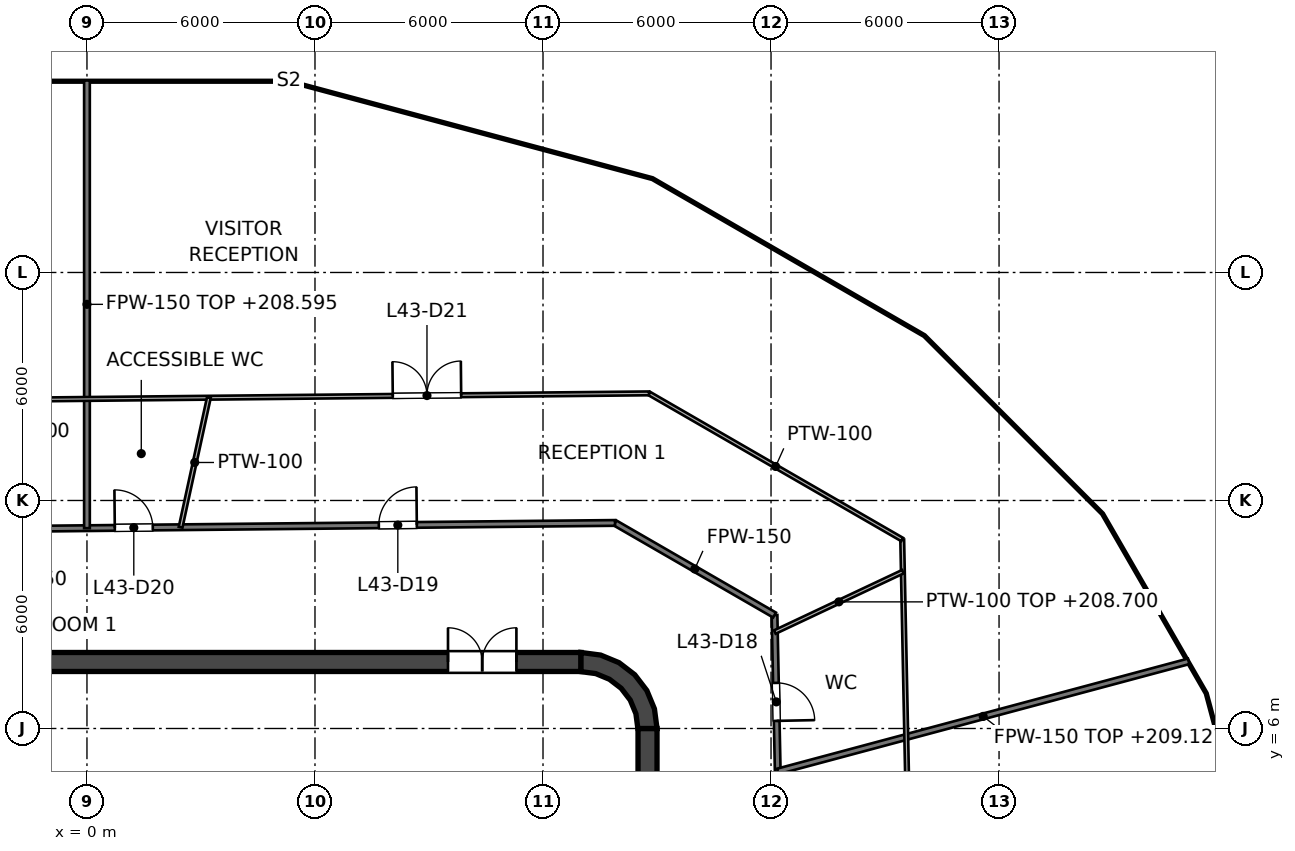
"""IFC4 building model, lengths in metres.
Left out: names, types, materials, properties, quantities, classifications, styles, units other than length and angle.
Written with IfcOpenShell. Run it as: python <this file> out.ifc"""

import sys

from ifc_helpers import new_model, si_unit, direction, frame, frame_2d, origin, place, context, subcontext, project, spatial, polyline, rectangle, outline, extrude, element, fill, save


model = new_model("IFC4")
c1 = context("Model", 3, precision=1e-05, world=origin(), true_north=direction((0.0, 1.0)))
c2 = subcontext(c1, "Body", "Model", "MODEL_VIEW")
j1 = project(units=[si_unit("LENGTHUNIT", "METRE"), si_unit("PLANEANGLEUNIT", "RADIAN")], contexts=[c1])
p1 = place(None, origin())
s1 = spatial("IfcSite", under=j1, at=p1, CompositionType="ELEMENT")
p2 = place(p1, origin())
s2 = spatial("IfcBuilding", under=s1, at=p2, CompositionType="ELEMENT")
p3 = place(p2, frame((0.0, 0.0, 203.0)))
s3 = spatial("IfcBuildingStorey", under=s2, at=p3, CompositionType="ELEMENT", Elevation=203.0)
p4 = place(p3, frame((-13.0, 7.75, 0.0), z_axis=(0.0, 0.0, 1.0), x_axis=(1.0, 0.0, 0.0)))
e1 = element("IfcWall", 1, at=p4, inside=s3, PredefinedType="SHEAR", context=c2, shape_type="SweptSolid", body=[
    extrude(rectangle(XDim=26.0, YDim=0.5, at=frame_2d((13.0, 0.0))), origin(), (0.0, 0.0, 1.0), 6.45),
])
p5 = place(p4, frame((1.7, 0.0, 0.0)))
e2 = element("IfcOpeningElement", 2, at=p5, cuts=e1, PredefinedType="OPENING", context=c2, shape_type="SweptSolid", body=[
    extrude(rectangle(XDim=1.8, YDim=2.1, at=frame_2d((0.9, 1.05))), frame((0.0, 0.25, 0.0), z_axis=(0.0, -1.0, 0.0), x_axis=(1.0, 0.0, 0.0)), (0.0, 0.0, 1.0), 0.5),
])
p6 = place(p4, frame((22.5, 0.0, 0.0)))
e3 = element("IfcOpeningElement", 3, at=p6, cuts=e1, PredefinedType="OPENING", context=c2, shape_type="SweptSolid", body=[
    extrude(rectangle(XDim=1.8, YDim=2.1, at=frame_2d((0.9, 1.05))), frame((0.0, 0.25, 0.0), z_axis=(0.0, -1.0, 0.0), x_axis=(1.0, 0.0, 0.0)), (0.0, 0.0, 1.0), 0.5),
])
p7 = place(p3, frame((14.75, -6.0, 0.0), z_axis=(0.0, 0.0, 1.0), x_axis=(0.0, 1.0, 0.0)))
e4 = element("IfcWall", 4, at=p7, inside=s3, PredefinedType="SHEAR", context=c2, shape_type="SweptSolid", body=[
    extrude(rectangle(XDim=12.0, YDim=0.5, at=frame_2d((6.0, 0.0))), origin(), (0.0, 0.0, 1.0), 6.45),
])
p8 = place(p3, origin())
e5 = element("IfcWall", 5, at=p8, inside=s3, PredefinedType="SHEAR", context=c2, shape_type="SweptSolid", body=[
    extrude(outline(polyline([(13.0, 8.0), (13.0, 7.496), (13.387, 7.445), (13.748, 7.295), (14.058, 7.058), (14.295, 6.748), (14.445, 6.387), (14.496, 6.0), (15.0, 6.0), (14.932, 6.518), (14.732, 7.0), (14.414, 7.414), (14.0, 7.732), (13.518, 7.932), (13.0, 8.0)])), origin(), (0.0, 0.0, 1.0), 6.45),
])
p9 = place(p3, frame((9.0, 4.1, 0.0), z_axis=(0.0, 0.0, 1.0), x_axis=(0.0, 1.0, 0.0)))
e6 = element("IfcWall", 6, at=p9, inside=s3, PredefinedType="SOLIDWALL", context=c2, shape_type="SweptSolid", body=[
    extrude(rectangle(XDim=2.5, YDim=0.25, at=frame_2d((1.25, 0.0))), origin(), (0.0, 0.0, 1.0), 5.7),
])
p10 = place(p9, frame((0.65, 0.0, 0.0)))
e7 = element("IfcOpeningElement", 7, at=p10, cuts=e6, PredefinedType="OPENING", context=c2, shape_type="SweptSolid", body=[
    extrude(rectangle(XDim=1.2, YDim=2.1, at=frame_2d((0.6, 1.05))), frame((0.0, 0.125, 0.0), z_axis=(0.0, -1.0, 0.0), x_axis=(1.0, 0.0, 0.0)), (0.0, 0.0, 1.0), 0.25),
])
p11 = place(p3, frame((3.15, 4.1, 0.0), z_axis=(0.0, 0.0, 1.0), x_axis=(0.0, 1.0, 0.0)))
e8 = element("IfcWall", 8, at=p11, inside=s3, PredefinedType="SOLIDWALL", context=c2, shape_type="SweptSolid", body=[
    extrude(rectangle(XDim=2.5, YDim=0.25, at=frame_2d((1.25, 0.0))), origin(), (0.0, 0.0, 1.0), 5.7),
])
p12 = place(p3, frame((-9.125, 7.05, 0.0), z_axis=(0.0, 0.0, 1.0), x_axis=(1.0, 0.0, 0.0)))
e9 = element("IfcWall", 9, at=p12, inside=s3, PredefinedType="SOLIDWALL", context=c2, shape_type="SweptSolid", body=[
    extrude(rectangle(XDim=18.25, YDim=0.9, at=frame_2d((9.125, 0.0))), origin(), (0.0, 0.0, 1.0), 5.7),
])
p13 = place(p3, frame((11.8, -7.5, 0.0), z_axis=(0.0, 0.0, 1.0), x_axis=(0.0, 1.0, 0.0)))
e10 = element("IfcWall", 10, at=p13, inside=s3, PredefinedType="SOLIDWALL", context=c2, shape_type="SweptSolid", body=[
    extrude(rectangle(XDim=15.0, YDim=0.4, at=frame_2d((7.5, 0.0))), origin(), (0.0, 0.0, 1.0), 5.7),
])
p14 = place(p13, frame((11.3, 0.0, 0.0)))
e11 = element("IfcOpeningElement", 11, at=p14, cuts=e10, PredefinedType="OPENING", context=c2, shape_type="SweptSolid", body=[
    extrude(rectangle(XDim=1.1, YDim=2.1, at=frame_2d((0.55, 1.05))), frame((0.0, 0.2, 0.0), z_axis=(0.0, -1.0, 0.0), x_axis=(1.0, 0.0, 0.0)), (0.0, 0.0, 1.0), 0.4),
])
p15 = place(p13, frame((8.4, 0.0, 0.0)))
e12 = element("IfcOpeningElement", 12, at=p15, cuts=e10, PredefinedType="OPENING", context=c2, shape_type="SweptSolid", body=[
    extrude(rectangle(XDim=1.1, YDim=2.1, at=frame_2d((0.55, 1.05))), frame((0.0, 0.2, 0.0), z_axis=(0.0, -1.0, 0.0), x_axis=(1.0, 0.0, 0.0)), (0.0, 0.0, 1.0), 0.4),
])
p16 = place(p13, frame((5.5, 0.0, 0.0)))
e13 = element("IfcOpeningElement", 13, at=p16, cuts=e10, PredefinedType="OPENING", context=c2, shape_type="SweptSolid", body=[
    extrude(rectangle(XDim=1.1, YDim=2.1, at=frame_2d((0.55, 1.05))), frame((0.0, 0.2, 0.0), z_axis=(0.0, -1.0, 0.0), x_axis=(1.0, 0.0, 0.0)), (0.0, 0.0, 1.0), 0.4),
])
p17 = place(p13, frame((2.6, 0.0, 0.0)))
e14 = element("IfcOpeningElement", 14, at=p17, cuts=e10, PredefinedType="OPENING", context=c2, shape_type="SweptSolid", body=[
    extrude(rectangle(XDim=1.1, YDim=2.1, at=frame_2d((0.55, 1.05))), frame((0.0, 0.2, 0.0), z_axis=(0.0, -1.0, 0.0), x_axis=(1.0, 0.0, 0.0)), (0.0, 0.0, 1.0), 0.4),
])
p18 = place(p13, frame((13.697, 0.0, 0.0)))
e15 = element("IfcOpeningElement", 15, at=p18, cuts=e10, PredefinedType="OPENING", context=c2, shape_type="SweptSolid", body=[
    extrude(rectangle(XDim=0.9, YDim=2.1, at=frame_2d((0.45, 1.05))), frame((0.0, 0.2, 0.0), z_axis=(0.0, -1.0, 0.0), x_axis=(1.0, 0.0, 0.0)), (0.0, 0.0, 1.0), 0.4),
])
p19 = place(p13, frame((0.403, 0.0, 0.0)))
e16 = element("IfcOpeningElement", 16, at=p19, cuts=e10, PredefinedType="OPENING", context=c2, shape_type="SweptSolid", body=[
    extrude(rectangle(XDim=0.9, YDim=2.1, at=frame_2d((0.45, 1.05))), frame((0.0, 0.2, 0.0), z_axis=(0.0, -1.0, 0.0), x_axis=(1.0, 0.0, 0.0)), (0.0, 0.0, 1.0), 0.4),
])
e17 = element("IfcWall", 17, at=p8, inside=s3, PredefinedType="SOLIDWALL", context=c2, shape_type="SweptSolid", body=[
    extrude(outline(polyline([(12.0, -5.675), (12.0, -5.925), (14.25, -5.925), (14.5, -5.925), (14.5, -5.675), (14.5, -3.025), (14.5, -2.775), (14.5, -0.125), (14.5, 0.125), (14.5, 2.775), (14.5, 3.025), (14.5, 5.675), (14.5, 5.925), (14.25, 5.925), (12.0, 5.925), (12.0, 5.675), (14.25, 5.675), (14.25, 3.025), (12.0, 3.025), (12.0, 2.775), (14.25, 2.775), (14.25, 0.125), (12.0, 0.125), (12.0, -0.125), (14.25, -0.125), (14.25, -2.775), (12.0, -2.775), (12.0, -3.025), (14.25, -3.025), (14.25, -5.675), (12.0, -5.675)])), origin(), (0.0, 0.0, 1.0), 5.7),
])
p20 = place(p3, frame((18.092, 8.986, 0.0), z_axis=(0.0, 0.0, 1.0), x_axis=(0.020463865079, -0.999790593187, 0.0)))
e18 = element("IfcWall", 18, at=p20, inside=s3, PredefinedType="PARTITIONING", context=c2, shape_type="SweptSolid", body=[
    extrude(rectangle(XDim=15.867, YDim=0.15, at=frame_2d((7.934, 0.0))), origin(), (0.0, 0.0, 1.0), 5.518),
])
p21 = place(p20, frame((1.787, 0.0, 0.0)))
e19 = element("IfcOpeningElement", 19, at=p21, cuts=e18, PredefinedType="OPENING", context=c2, shape_type="SweptSolid", body=[
    extrude(rectangle(XDim=1.0, YDim=2.1, at=frame_2d((0.5, 1.05))), frame((0.0, 0.075, 0.0), z_axis=(0.0, -1.0, 0.0), x_axis=(1.0, 0.0, 0.0)), (0.0, 0.0, 1.0), 0.15),
])
p22 = place(p20, frame((8.756, 0.0, 0.0)))
e20 = element("IfcOpeningElement", 20, at=p22, cuts=e18, PredefinedType="OPENING", context=c2, shape_type="SweptSolid", body=[
    extrude(rectangle(XDim=1.0, YDim=2.1, at=frame_2d((0.5, 1.05))), frame((0.0, 0.075, 0.0), z_axis=(0.0, -1.0, 0.0), x_axis=(1.0, 0.0, 0.0)), (0.0, 0.0, 1.0), 0.15),
])
p23 = place(p3, frame((13.895, 11.409, 0.0), z_axis=(0.0, 0.0, 1.0), x_axis=(0.866017793092, -0.500013181875, 0.0)))
e21 = element("IfcWall", 21, at=p23, inside=s3, PredefinedType="PARTITIONING", context=c2, shape_type="SweptSolid", body=[
    extrude(rectangle(XDim=4.846, YDim=0.15, at=frame_2d((2.423, 0.0))), origin(), (0.0, 0.0, 1.0), 5.527),
])
p24 = place(p3, frame((-15.974, 11.113, 0.0), z_axis=(0.0, 0.0, 1.0), x_axis=(0.999950853314, 0.009914179568, 0.0)))
e22 = element("IfcWall", 22, at=p24, inside=s3, PredefinedType="PARTITIONING", context=c2, shape_type="SweptSolid", body=[
    extrude(rectangle(XDim=29.871, YDim=0.15, at=frame_2d((14.935, 0.0))), origin(), (0.0, 0.0, 1.0), 5.527),
])
p25 = place(p24, frame((23.655, 0.0, 0.0)))
e23 = element("IfcOpeningElement", 23, at=p25, cuts=e22, PredefinedType="OPENING", context=c2, shape_type="SweptSolid", body=[
    extrude(rectangle(XDim=1.0, YDim=2.1, at=frame_2d((0.5, 1.05))), frame((0.0, 0.075, 0.0), z_axis=(0.0, -1.0, 0.0), x_axis=(1.0, 0.0, 0.0)), (0.0, 0.0, 1.0), 0.15),
])
p26 = place(p24, frame((16.707, 0.0, 0.0)))
e24 = element("IfcOpeningElement", 24, at=p26, cuts=e22, PredefinedType="OPENING", context=c2, shape_type="SweptSolid", body=[
    extrude(rectangle(XDim=1.0, YDim=2.1, at=frame_2d((0.5, 1.05))), frame((0.0, 0.075, 0.0), z_axis=(0.0, -1.0, 0.0), x_axis=(1.0, 0.0, 0.0)), (0.0, 0.0, 1.0), 0.15),
])
p27 = place(p24, frame((13.027, 0.0, 0.0)))
e25 = element("IfcOpeningElement", 25, at=p27, cuts=e22, PredefinedType="OPENING", context=c2, shape_type="SweptSolid", body=[
    extrude(rectangle(XDim=1.0, YDim=2.1, at=frame_2d((0.5, 1.05))), frame((0.0, 0.075, 0.0), z_axis=(0.0, -1.0, 0.0), x_axis=(1.0, 0.0, 0.0)), (0.0, 0.0, 1.0), 0.15),
])
p28 = place(p24, frame((6.011, 0.0, 0.0)))
e26 = element("IfcOpeningElement", 26, at=p28, cuts=e22, PredefinedType="OPENING", context=c2, shape_type="SweptSolid", body=[
    extrude(rectangle(XDim=1.0, YDim=2.1, at=frame_2d((0.5, 1.05))), frame((0.0, 0.075, 0.0), z_axis=(0.0, -1.0, 0.0), x_axis=(1.0, 0.0, 0.0)), (0.0, 0.0, 1.0), 0.15),
])
p29 = place(p3, frame((18.177, 4.87, 0.0), z_axis=(0.0, 0.0, 1.0), x_axis=(0.965933448556, 0.258790596738, 0.0)))
e27 = element("IfcWall", 27, at=p29, inside=s3, PredefinedType="PARTITIONING", context=c2, shape_type="SweptSolid", body=[
    extrude(rectangle(XDim=11.193, YDim=0.15, at=frame_2d((5.597, 0.0))), origin(), (0.0, 0.0, 1.0), 6.127),
])
p30 = place(p3, frame((0.0, 11.271, 0.0), z_axis=(0.0, 0.0, 1.0), x_axis=(0.0, 1.0, 0.0)))
e28 = element("IfcWall", 28, at=p30, inside=s3, PredefinedType="PARTITIONING", context=c2, shape_type="SweptSolid", body=[
    extrude(rectangle(XDim=11.781, YDim=0.15, at=frame_2d((5.891, 0.0))), origin(), (0.0, 0.0, 1.0), 5.595),
])
p31 = place(p3, frame((21.452, 10.972, 0.0), z_axis=(0.0, 0.0, 1.0), x_axis=(0.020449379556, -0.999790889574, 0.0)))
e29 = element("IfcWall", 29, at=p31, inside=s3, PredefinedType="PARTITIONING", context=c2, shape_type="SweptSolid", body=[
    extrude(rectangle(XDim=18.732, YDim=0.1, at=frame_2d((9.366, 0.0))), origin(), (0.0, 0.0, 1.0), 5.518),
])
p32 = place(p31, frame((11.118, 0.0, 0.0)))
e30 = element("IfcOpeningElement", 30, at=p32, cuts=e29, PredefinedType="OPENING", context=c2, shape_type="SweptSolid", body=[
    extrude(rectangle(XDim=1.8, YDim=2.1, at=frame_2d((0.9, 1.05))), frame((0.0, 0.05, 0.0), z_axis=(0.0, -1.0, 0.0), x_axis=(1.0, 0.0, 0.0)), (0.0, 0.0, 1.0), 0.1),
])
p33 = place(p3, frame((14.79, 14.818, 0.0), z_axis=(0.0, 0.0, 1.0), x_axis=(0.866027558591, -0.499996267748, 0.0)))
e31 = element("IfcWall", 31, at=p33, inside=s3, PredefinedType="PARTITIONING", context=c2, shape_type="SweptSolid", body=[
    extrude(rectangle(XDim=7.692, YDim=0.1, at=frame_2d((3.846, 0.0))), origin(), (0.0, 0.0, 1.0), 5.527),
])
p34 = place(p3, frame((-17.948, 14.494, 0.0), z_axis=(0.0, 0.0, 1.0), x_axis=(0.999950742898, 0.009925309958, 0.0)))
e32 = element("IfcWall", 32, at=p34, inside=s3, PredefinedType="PARTITIONING", context=c2, shape_type="SweptSolid", body=[
    extrude(rectangle(XDim=32.74, YDim=0.1, at=frame_2d((16.37, 0.0))), origin(), (0.0, 0.0, 1.0), 5.527),
])
p35 = place(p34, frame((25.996, 0.0, 0.0)))
e33 = element("IfcOpeningElement", 33, at=p35, cuts=e32, PredefinedType="OPENING", context=c2, shape_type="SweptSolid", body=[
    extrude(rectangle(XDim=1.8, YDim=2.1, at=frame_2d((0.9, 1.05))), frame((0.0, 0.05, 0.0), z_axis=(0.0, -1.0, 0.0), x_axis=(1.0, 0.0, 0.0)), (0.0, 0.0, 1.0), 0.1),
])
p36 = place(p34, frame((8.024, 0.0, 0.0)))
e34 = element("IfcOpeningElement", 34, at=p36, cuts=e32, PredefinedType="OPENING", context=c2, shape_type="SweptSolid", body=[
    extrude(rectangle(XDim=1.8, YDim=2.1, at=frame_2d((0.9, 1.05))), frame((0.0, 0.05, 0.0), z_axis=(0.0, -1.0, 0.0), x_axis=(1.0, 0.0, 0.0)), (0.0, 0.0, 1.0), 0.1),
])
p37 = place(p3, frame((18.101, 8.538, 0.0), z_axis=(0.0, 0.0, 1.0), x_axis=(0.904509384474, 0.426453717769, 0.0)))
e35 = element("IfcWall", 35, at=p37, inside=s3, PredefinedType="PARTITIONING", context=c2, shape_type="SweptSolid", body=[
    extrude(rectangle(XDim=3.723, YDim=0.1, at=frame_2d((1.862, 0.0))), origin(), (0.0, 0.0, 1.0), 5.7),
])
p38 = place(p3, frame((2.464, 11.296, 0.0), z_axis=(0.0, 0.0, 1.0), x_axis=(0.212978790234, 0.977056822764, 0.0)))
e36 = element("IfcWall", 36, at=p38, inside=s3, PredefinedType="PARTITIONING", context=c2, shape_type="SweptSolid", body=[
    extrude(rectangle(XDim=3.488, YDim=0.1, at=frame_2d((1.744, 0.0))), origin(), (0.0, 0.0, 1.0), 5.527),
])
p39 = place(p14, origin())
e37 = element("IfcDoor", 37, at=p39, inside=s3, OperationType="DOUBLE_DOOR_SLIDING", PredefinedType="DOOR", context=c2, shape_type="SweptSolid", body=[
    extrude(rectangle(XDim=1.1, YDim=2.1, at=frame_2d((0.55, 1.05))), frame((0.0, 0.025, 0.0), z_axis=(0.0, -1.0, 0.0), x_axis=(1.0, 0.0, 0.0)), (0.0, 0.0, 1.0), 0.05),
])
fill(e11, e37)
p40 = place(p10, origin())
e38 = element("IfcDoor", 38, at=p40, inside=s3, OperationType="SINGLE_SWING_LEFT", PredefinedType="DOOR", context=c2, shape_type="SweptSolid", body=[
    extrude(rectangle(XDim=1.2, YDim=2.1, at=frame_2d((0.6, 1.05))), frame((0.0, 0.025, 0.0), z_axis=(0.0, -1.0, 0.0), x_axis=(1.0, 0.0, 0.0)), (0.0, 0.0, 1.0), 0.05),
])
fill(e7, e38)
p41 = place(p18, origin())
e39 = element("IfcDoor", 39, at=p41, inside=s3, OperationType="SINGLE_SWING_RIGHT", PredefinedType="DOOR", context=c2, shape_type="SweptSolid", body=[
    extrude(rectangle(XDim=0.9, YDim=2.1, at=frame_2d((0.45, 1.05))), frame((0.0, 0.025, 0.0), z_axis=(0.0, -1.0, 0.0), x_axis=(1.0, 0.0, 0.0)), (0.0, 0.0, 1.0), 0.05),
])
fill(e15, e39)
p42 = place(p6, origin())
e40 = element("IfcDoor", 40, at=p42, inside=s3, OperationType="DOUBLE_DOOR_SINGLE_SWING", PredefinedType="DOOR", context=c2, shape_type="SweptSolid", body=[
    extrude(rectangle(XDim=1.8, YDim=2.1, at=frame_2d((0.9, 1.05))), frame((0.0, 0.025, 0.0), z_axis=(0.0, -1.0, 0.0), x_axis=(1.0, 0.0, 0.0)), (0.0, 0.0, 1.0), 0.05),
])
fill(e3, e40)
p43 = place(p21, origin())
e41 = element("IfcDoor", 41, at=p43, inside=s3, OperationType="SINGLE_SWING_RIGHT", PredefinedType="DOOR", context=c2, shape_type="SweptSolid", body=[
    extrude(rectangle(XDim=1.0, YDim=2.1, at=frame_2d((0.5, 1.05))), frame((0.0, 0.025, 0.0), z_axis=(0.0, -1.0, 0.0), x_axis=(1.0, 0.0, 0.0)), (0.0, 0.0, 1.0), 0.05),
])
fill(e19, e41)
p44 = place(p25, origin())
e42 = element("IfcDoor", 42, at=p44, inside=s3, OperationType="SINGLE_SWING_RIGHT", PredefinedType="DOOR", context=c2, shape_type="SweptSolid", body=[
    extrude(rectangle(XDim=1.0, YDim=2.1, at=frame_2d((0.5, 1.05))), frame((0.0, 0.025, 0.0), z_axis=(0.0, -1.0, 0.0), x_axis=(1.0, 0.0, 0.0)), (0.0, 0.0, 1.0), 0.05),
])
fill(e23, e42)
p45 = place(p26, origin())
e43 = element("IfcDoor", 43, at=p45, inside=s3, OperationType="SINGLE_SWING_LEFT", PredefinedType="DOOR", context=c2, shape_type="SweptSolid", body=[
    extrude(rectangle(XDim=1.0, YDim=2.1, at=frame_2d((0.5, 1.05))), frame((0.0, 0.025, 0.0), z_axis=(0.0, -1.0, 0.0), x_axis=(1.0, 0.0, 0.0)), (0.0, 0.0, 1.0), 0.05),
])
fill(e24, e43)
p46 = place(p35, origin())
e44 = element("IfcDoor", 44, at=p46, inside=s3, OperationType="DOUBLE_DOOR_SINGLE_SWING", PredefinedType="DOOR", context=c2, shape_type="SweptSolid", body=[
    extrude(rectangle(XDim=1.8, YDim=2.1, at=frame_2d((0.9, 1.05))), frame((0.0, 0.025, 0.0), z_axis=(0.0, -1.0, 0.0), x_axis=(1.0, 0.0, 0.0)), (0.0, 0.0, 1.0), 0.05),
])
fill(e33, e44)
save(model, sys.argv[1])
